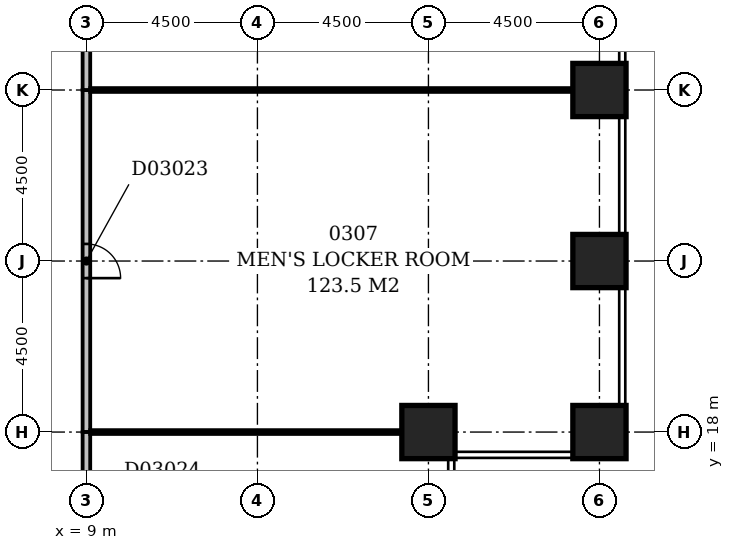
"""IFC4 building model, lengths in metres.
Left out: names, types, materials, properties, quantities, classifications, styles, units other than length and angle.
Written with IfcOpenShell. Run it as: python <this file> out.ifc"""

import sys

from ifc_helpers import new_model, si_unit, direction, frame, frame_2d, origin, origin_2d, place, context, subcontext, project, spatial, rectangle, extrude, element, fill, save


model = new_model("IFC4")
c1 = context("Model", 3, precision=1e-05, world=origin(), true_north=direction((0.0, 1.0)))
c2 = subcontext(c1, "Body", "Model", "MODEL_VIEW")
j1 = project(units=[si_unit("LENGTHUNIT", "METRE"), si_unit("PLANEANGLEUNIT", "RADIAN")], contexts=[c1])
p1 = place(None, origin())
s1 = spatial("IfcSite", under=j1, at=p1, CompositionType="ELEMENT")
p2 = place(p1, origin())
s2 = spatial("IfcBuilding", under=s1, at=p2, CompositionType="ELEMENT")
p3 = place(p2, frame((0.0, 0.0, 19.0)))
s3 = spatial("IfcBuildingStorey", under=s2, at=p3, CompositionType="ELEMENT", Elevation=19.0)
for number, where, z_axis, x_axis in (
    (1, (18.0, 18.0, -0.4), (0.0, 0.0, 1.0), (1.0, 0.0, 0.0)),
    (2, (22.5, 18.0, -0.4), (0.0, 0.0, 1.0), (1.0, 0.0, 0.0)),
    (3, (22.5, 22.5, -0.4), (0.0, 0.0, 1.0), (1.0, 0.0, 0.0)),
    (4, (22.5, 27.0, -0.4), (0.0, 0.0, 1.0), (1.0, 0.0, 0.0)),
):
    element("IfcColumn", number, at=place(p3, frame(where, z_axis=z_axis, x_axis=x_axis)), inside=s3, PredefinedType="COLUMN", context=c2, shape_type="SweptSolid", body=[
        extrude(rectangle(XDim=1.4, YDim=1.4, at=origin_2d()), origin(), (0.0, 0.0, 1.0), 4.95),
    ])
p4 = place(p3, frame((9.0, 9.0, 0.0), z_axis=(0.0, 0.0, 1.0), x_axis=(0.0, 1.0, 0.0)))
e5 = element("IfcWall", 5, at=p4, inside=s3, PredefinedType="PARTITIONING", context=c2, shape_type="SweptSolid", body=[
    extrude(rectangle(XDim=9.0, YDim=0.2, at=frame_2d((4.5, 0.0))), origin(), (0.0, 0.0, 1.0), 4.55),
])
p5 = place(p4, frame((4.025, 0.0, 0.0)))
e6 = element("IfcOpeningElement", 6, at=p5, cuts=e5, PredefinedType="OPENING", context=c2, shape_type="SweptSolid", body=[
    extrude(rectangle(XDim=0.9, YDim=2.1, at=frame_2d((0.45, 1.05))), frame((0.0, 0.112, 0.0), z_axis=(0.0, -1.0, 0.0), x_axis=(1.0, 0.0, 0.0)), (0.0, 0.0, 1.0), 0.224),
])
p6 = place(p3, frame((9.0, 18.0, 0.0), z_axis=(0.0, 0.0, 1.0), x_axis=(0.0, 1.0, 0.0)))
e7 = element("IfcWall", 7, at=p6, inside=s3, PredefinedType="PARTITIONING", context=c2, shape_type="SweptSolid", body=[
    extrude(rectangle(XDim=9.0, YDim=0.2, at=frame_2d((4.5, 0.0))), origin(), (0.0, 0.0, 1.0), 4.55),
])
p7 = place(p6, frame((4.05, 0.0, 0.0)))
e8 = element("IfcOpeningElement", 8, at=p7, cuts=e7, PredefinedType="OPENING", context=c2, shape_type="SweptSolid", body=[
    extrude(rectangle(XDim=0.9, YDim=2.1, at=frame_2d((0.45, 1.05))), frame((0.0, 0.112, 0.0), z_axis=(0.0, -1.0, 0.0), x_axis=(1.0, 0.0, 0.0)), (0.0, 0.0, 1.0), 0.224),
])
p8 = place(p3, frame((18.0, 18.0, 0.0), z_axis=(0.0, 0.0, 1.0), x_axis=(-1.0, 0.0, 0.0)))
e9 = element("IfcWall", 9, at=p8, inside=s3, PredefinedType="PARTITIONING", context=c2, shape_type="SweptSolid", body=[
    extrude(rectangle(XDim=8.9, YDim=0.1, at=frame_2d((4.45, 0.0))), origin(), (0.0, 0.0, 1.0), 3.85),
])
p9 = place(p3, frame((18.7, 18.0, 0.0), z_axis=(0.0, 0.0, 1.0), x_axis=(-1.0, 0.0, 0.0)))
e10 = element("IfcWall", 10, at=p9, inside=s3, PredefinedType="PARTITIONING", context=c2, shape_type="SweptSolid", body=[
    extrude(rectangle(XDim=0.7, YDim=0.1, at=frame_2d((0.35, 0.0))), origin(), (0.0, 0.0, 1.0), 3.9),
])
p10 = place(p3, frame((9.0, 27.0, 0.0), z_axis=(0.0, 0.0, 1.0), x_axis=(0.0, 1.0, 0.0)))
e11 = element("IfcWall", 11, at=p10, inside=s3, PredefinedType="PARTITIONING", context=c2, shape_type="SweptSolid", body=[
    extrude(rectangle(XDim=9.0, YDim=0.2, at=frame_2d((4.5, 0.0))), origin(), (0.0, 0.0, 1.0), 4.55),
])
p11 = place(p10, frame((4.05, 0.0, 0.0)))
e12 = element("IfcOpeningElement", 12, at=p11, cuts=e11, PredefinedType="OPENING", context=c2, shape_type="SweptSolid", body=[
    extrude(rectangle(XDim=0.9, YDim=2.1, at=frame_2d((0.45, 1.05))), frame((0.0, 0.112, 0.0), z_axis=(0.0, -1.0, 0.0), x_axis=(1.0, 0.0, 0.0)), (0.0, 0.0, 1.0), 0.224),
])
p12 = place(p3, frame((22.5, 27.0, 0.0), z_axis=(0.0, 0.0, 1.0), x_axis=(-1.0, 0.0, 0.0)))
e13 = element("IfcWall", 13, at=p12, inside=s3, PredefinedType="PARTITIONING", context=c2, shape_type="SweptSolid", body=[
    extrude(rectangle(XDim=13.4, YDim=0.1, at=frame_2d((6.7, 0.0))), origin(), (0.0, 0.0, 1.0), 3.95),
])
p13 = place(p7, frame((0.9, 0.0, 0.0), z_axis=(0.0, 0.0, 1.0), x_axis=(-1.0, 0.0, 0.0)))
e14 = element("IfcDoor", 14, at=p13, inside=s3, OperationType="SINGLE_SWING_RIGHT", PredefinedType="DOOR", context=c2, shape_type="SweptSolid", body=[
    extrude(rectangle(XDim=0.9, YDim=2.1, at=frame_2d((0.45, 1.05))), frame((0.0, 0.025, 0.0), z_axis=(0.0, -1.0, 0.0), x_axis=(1.0, 0.0, 0.0)), (0.0, 0.0, 1.0), 0.05),
])
fill(e8, e14)
save(model, sys.argv[1])
